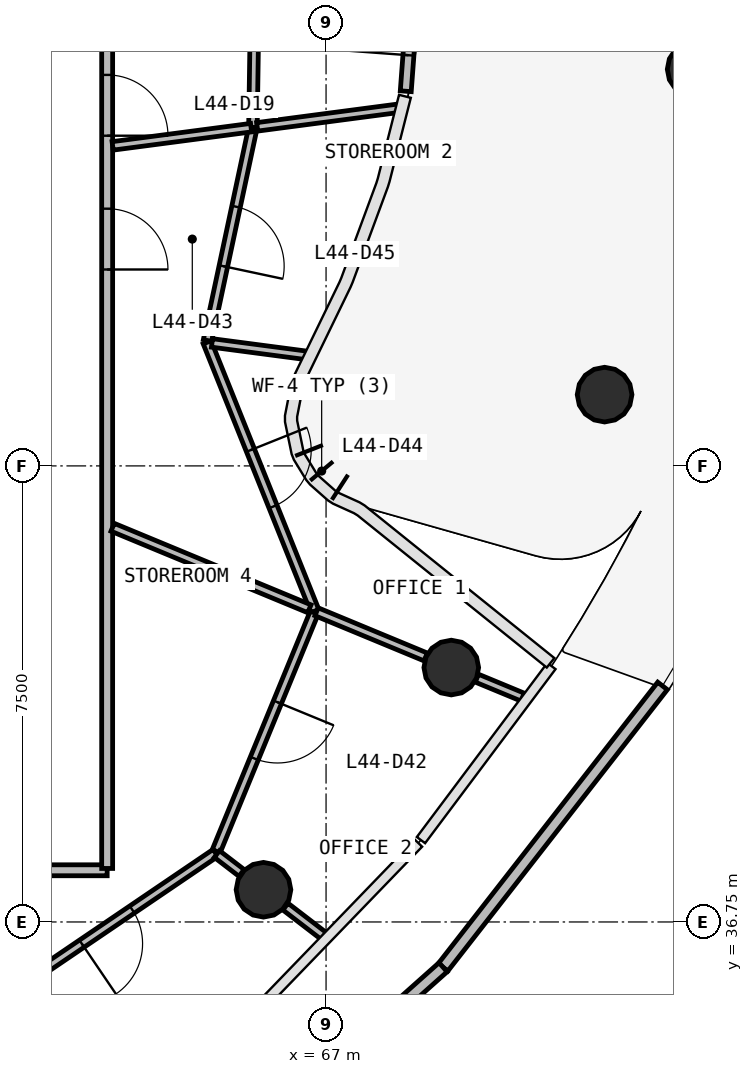
"""IFC4 building model, lengths in metres.
Left out: names, types, materials, properties, quantities, classifications, styles, units other than length and angle.
Written with IfcOpenShell. Run it as: python <this file> out.ifc"""

import sys

from ifc_helpers import new_model, si_unit, direction, frame, frame_2d, origin, origin_2d, place, context, subcontext, project, spatial, rectangle, circle, extrude, source, transform, mapped, element, fill, save


model = new_model("IFC4")
c1 = context("Model", 3, precision=1e-05, world=origin(), true_north=direction((0.0, 1.0)))
c2 = subcontext(c1, "Body", "Model", "MODEL_VIEW")
j1 = project(units=[si_unit("LENGTHUNIT", "METRE"), si_unit("PLANEANGLEUNIT", "RADIAN")], contexts=[c1])
p1 = place(None, origin())
s1 = spatial("IfcSite", under=j1, at=p1, CompositionType="ELEMENT")
p2 = place(p1, origin())
s2 = spatial("IfcBuilding", under=s1, at=p2, CompositionType="ELEMENT")
p3 = place(p2, frame((0.0, 0.0, 183.8)))
s3 = spatial("IfcBuildingStorey", under=s2, at=p3, CompositionType="ELEMENT", Elevation=183.8)
m1 = source(origin(), c2, "Body", "SweptSolid", [
    extrude(circle(Radius=0.45, at=origin_2d()), origin(), (0.0, 0.0, 1.0), 4.22),
])
for number, where, z_axis, x_axis in (
    (1, (73.062, 50.773, -0.32), (0.0, 0.0, 1.0), (1.0, 0.0, 0.0)),
    (2, (65.971, 37.28, -0.32), (0.0, 0.0, 1.0), (1.0, 0.0, 0.0)),
    (3, (69.059, 40.934, -0.32), (0.0, 0.0, 1.0), (1.0, 0.0, 0.0)),
    (4, (71.581, 45.422, -0.32), (0.0, 0.0, 1.0), (1.0, 0.0, 0.0)),
):
    element("IfcColumn", number, at=place(p3, frame(where, z_axis=z_axis, x_axis=x_axis)), inside=s3, PredefinedType="COLUMN", context=c2, shape_type="MappedRepresentation", body=[
        mapped(m1, transform((0.0, 0.0, 0.0), scale=1.0)),
    ])
p4 = place(p3, frame((68.311, 50.412, 0.0), z_axis=(0.0, 0.0, 1.0), x_axis=(0.074271967477, 0.997238023166, 0.0)))
e5 = element("IfcWall", 5, at=p4, inside=s3, PredefinedType="STANDARD", context=c2, shape_type="SweptSolid", body=[
    extrude(rectangle(XDim=2.988, YDim=0.18, at=frame_2d((1.494, 0.0))), origin(), (0.0, 0.0, 1.0), 3.58),
])
p5 = place(p4, frame((0.594, 0.0, 0.0)))
e6 = element("IfcOpeningElement", 6, at=p5, cuts=e5, PredefinedType="OPENING", context=c2, shape_type="SweptSolid", body=[
    extrude(rectangle(XDim=1.8, YDim=2.4, at=frame_2d((0.9, 1.2))), frame((0.0, 0.1, 0.0), z_axis=(0.0, -1.0, 0.0), x_axis=(1.0, 0.0, 0.0)), (0.0, 0.0, 1.0), 0.2),
])
p6 = place(p3, frame((72.534, 40.632, 0.0), z_axis=(0.0, 0.0, 1.0), x_axis=(-0.615037489788, -0.788497866931, 0.0)))
e7 = element("IfcWall", 7, at=p6, inside=s3, PredefinedType="PARAPET", context=c2, shape_type="SweptSolid", body=[
    extrude(rectangle(XDim=5.868, YDim=0.2, at=frame_2d((2.934, 0.0))), origin(), (0.0, 0.0, 1.0), 1.1),
])
p7 = place(p3, frame((68.925, 36.005, 0.0), z_axis=(0.0, 0.0, 1.0), x_axis=(-0.746520458461, -0.665362461444, 0.0)))
e8 = element("IfcWall", 8, at=p7, inside=s3, PredefinedType="PARAPET", context=c2, shape_type="SweptSolid", body=[
    extrude(rectangle(XDim=5.869, YDim=0.2, at=frame_2d((2.935, 0.0))), origin(), (0.0, 0.0, 1.0), 1.1),
])
p8 = place(p3, frame((63.4, 37.6, 0.0), z_axis=(0.0, 0.0, 1.0), x_axis=(-1.0, 0.0, 0.0)))
e9 = element("IfcWall", 9, at=p8, inside=s3, PredefinedType="PARTITIONING", context=c2, shape_type="SweptSolid", body=[
    extrude(rectangle(XDim=22.8, YDim=0.18, at=frame_2d((11.4, 0.0))), origin(), (0.0, 0.0, 1.0), 2.88),
])
p9 = place(p8, frame((10.95, 0.0, 0.0)))
e10 = element("IfcOpeningElement", 10, at=p9, cuts=e9, PredefinedType="OPENING", context=c2, shape_type="SweptSolid", body=[
    extrude(rectangle(XDim=1.0, YDim=2.1, at=frame_2d((0.5, 1.05))), frame((0.0, 0.1, 0.0), z_axis=(0.0, -1.0, 0.0), x_axis=(1.0, 0.0, 0.0)), (0.0, 0.0, 1.0), 0.2),
])
p10 = place(p8, frame((5.75, 0.0, 0.0)))
e11 = element("IfcOpeningElement", 11, at=p10, cuts=e9, PredefinedType="OPENING", context=c2, shape_type="SweptSolid", body=[
    extrude(rectangle(XDim=1.0, YDim=2.1, at=frame_2d((0.5, 1.05))), frame((0.0, 0.1, 0.0), z_axis=(0.0, -1.0, 0.0), x_axis=(1.0, 0.0, 0.0)), (0.0, 0.0, 1.0), 0.2),
])
p11 = place(p3, frame((63.4, 58.37, 0.0), z_axis=(0.0, 0.0, 1.0), x_axis=(0.0, -1.0, 0.0)))
e12 = element("IfcWall", 12, at=p11, inside=s3, PredefinedType="PARTITIONING", context=c2, shape_type="SweptSolid", body=[
    extrude(rectangle(XDim=20.74, YDim=0.18, at=frame_2d((10.37, 0.0))), origin(), (0.0, 0.0, 1.0), 2.88),
])
p12 = place(p11, frame((7.69, 0.0, 0.0)))
e13 = element("IfcOpeningElement", 13, at=p12, cuts=e12, PredefinedType="OPENING", context=c2, shape_type="SweptSolid", body=[
    extrude(rectangle(XDim=1.0, YDim=2.1, at=frame_2d((0.5, 1.05))), frame((0.0, 0.1, 0.0), z_axis=(0.0, -1.0, 0.0), x_axis=(1.0, 0.0, 0.0)), (0.0, 0.0, 1.0), 0.2),
])
p13 = place(p11, frame((9.89, 0.0, 0.0)))
e14 = element("IfcOpeningElement", 14, at=p13, cuts=e12, PredefinedType="OPENING", context=c2, shape_type="SweptSolid", body=[
    extrude(rectangle(XDim=1.0, YDim=2.1, at=frame_2d((0.5, 1.05))), frame((0.0, 0.1, 0.0), z_axis=(0.0, -1.0, 0.0), x_axis=(1.0, 0.0, 0.0)), (0.0, 0.0, 1.0), 0.2),
])
p14 = place(p3, frame((65.044, 46.283, 0.0), z_axis=(0.0, 0.0, 1.0), x_axis=(0.372115410521, -0.92818646901, 0.0)))
e15 = element("IfcWall", 15, at=p14, inside=s3, PredefinedType="PARTITIONING", context=c2, shape_type="SweptSolid", body=[
    extrude(rectangle(XDim=4.762, YDim=0.14, at=frame_2d((2.381, 0.0))), origin(), (0.0, 0.0, 1.0), 2.88),
])
p15 = place(p14, frame((1.912, 0.0, 0.0)))
e16 = element("IfcOpeningElement", 16, at=p15, cuts=e15, PredefinedType="OPENING", context=c2, shape_type="SweptSolid", body=[
    extrude(rectangle(XDim=1.0, YDim=2.1, at=frame_2d((0.5, 1.05))), frame((0.0, 0.08, 0.0), z_axis=(0.0, -1.0, 0.0), x_axis=(1.0, 0.0, 0.0)), (0.0, 0.0, 1.0), 0.16),
])
p16 = place(p3, frame((65.182, 37.885, 0.0), z_axis=(0.0, 0.0, 1.0), x_axis=(-0.827453202768, -0.561534680344, 0.0)))
e17 = element("IfcWall", 17, at=p16, inside=s3, PredefinedType="PARTITIONING", context=c2, shape_type="SweptSolid", body=[
    extrude(rectangle(XDim=4.308, YDim=0.14, at=frame_2d((2.154, 0.0))), origin(), (0.0, 0.0, 1.0), 2.88),
])
p17 = place(p16, frame((1.658, 0.0, 0.0)))
e18 = element("IfcOpeningElement", 18, at=p17, cuts=e17, PredefinedType="OPENING", context=c2, shape_type="SweptSolid", body=[
    extrude(rectangle(XDim=1.0, YDim=2.1, at=frame_2d((0.5, 1.05))), frame((0.0, 0.08, 0.0), z_axis=(0.0, -1.0, 0.0), x_axis=(1.0, 0.0, 0.0)), (0.0, 0.0, 1.0), 0.16),
])
p18 = place(p3, frame((66.805, 41.835, 0.0), z_axis=(0.0, 0.0, 1.0), x_axis=(-0.380060488543, -0.924961634366, 0.0)))
e19 = element("IfcWall", 19, at=p18, inside=s3, PredefinedType="PARTITIONING", context=c2, shape_type="SweptSolid", body=[
    extrude(rectangle(XDim=4.24, YDim=0.14, at=frame_2d((2.12, 0.0))), origin(), (0.0, 0.0, 1.0), 2.88),
])
p19 = place(p18, frame((1.59, 0.0, 0.0)))
e20 = element("IfcOpeningElement", 20, at=p19, cuts=e19, PredefinedType="OPENING", context=c2, shape_type="SweptSolid", body=[
    extrude(rectangle(XDim=1.0, YDim=2.1, at=frame_2d((0.5, 1.05))), frame((0.0, 0.08, 0.0), z_axis=(0.0, -1.0, 0.0), x_axis=(1.0, 0.0, 0.0)), (0.0, 0.0, 1.0), 0.16),
])
p20 = place(p3, frame((65.855, 53.709, 0.0), z_axis=(0.0, 0.0, 1.0), x_axis=(-0.014924646714, -0.999888621258, 0.0)))
e21 = element("IfcWall", 21, at=p20, inside=s3, PredefinedType="PARTITIONING", context=c2, shape_type="SweptSolid", body=[
    extrude(rectangle(XDim=3.893, YDim=0.14, at=frame_2d((1.947, 0.0))), origin(), (0.0, 0.0, 1.0), 2.88),
])
p21 = place(p20, frame((1.443, 0.0, 0.0)))
e22 = element("IfcOpeningElement", 22, at=p21, cuts=e21, PredefinedType="OPENING", context=c2, shape_type="SweptSolid", body=[
    extrude(rectangle(XDim=1.0, YDim=2.1, at=frame_2d((0.5, 1.05))), frame((0.0, 0.08, 0.0), z_axis=(0.0, -1.0, 0.0), x_axis=(1.0, 0.0, 0.0)), (0.0, 0.0, 1.0), 0.16),
])
p22 = place(p3, frame((63.49, 43.241, 0.0), z_axis=(0.0, 0.0, 1.0), x_axis=(0.92386899199, -0.382708878444, 0.0)))
e23 = element("IfcWall", 23, at=p22, inside=s3, PredefinedType="PARTITIONING", context=c2, shape_type="SweptSolid", body=[
    extrude(rectangle(XDim=3.502, YDim=0.14, at=frame_2d((1.751, 0.0))), origin(), (0.0, 0.0, 1.0), 2.88),
])
p23 = place(p3, frame((65.791, 49.787, 0.0), z_axis=(0.0, 0.0, 1.0), x_axis=(-0.20840274736, -0.978043094599, 0.0)))
e24 = element("IfcWall", 24, at=p23, inside=s3, PredefinedType="PARTITIONING", context=c2, shape_type="SweptSolid", body=[
    extrude(rectangle(XDim=3.553, YDim=0.14, at=frame_2d((1.777, 0.0))), origin(), (0.0, 0.0, 1.0), 2.88),
])
p24 = place(p23, frame((1.303, 0.0, 0.0)))
e25 = element("IfcOpeningElement", 25, at=p24, cuts=e24, PredefinedType="OPENING", context=c2, shape_type="SweptSolid", body=[
    extrude(rectangle(XDim=1.0, YDim=2.1, at=frame_2d((0.5, 1.05))), frame((0.0, 0.08, 0.0), z_axis=(0.0, -1.0, 0.0), x_axis=(1.0, 0.0, 0.0)), (0.0, 0.0, 1.0), 0.16),
])
p25 = place(p3, frame((65.867, 49.826, 0.0), z_axis=(0.0, 0.0, 1.0), x_axis=(0.991441898965, 0.130548691974, 0.0)))
e26 = element("IfcWall", 26, at=p25, inside=s3, PredefinedType="PARTITIONING", context=c2, shape_type="SweptSolid", body=[
    extrude(rectangle(XDim=2.347, YDim=0.14, at=frame_2d((1.173, 0.0))), origin(), (0.0, 0.0, 1.0), 2.88),
])
p26 = place(p3, frame((63.49, 49.513, 0.0), z_axis=(0.0, 0.0, 1.0), x_axis=(0.991447421324, 0.130506745995, 0.0)))
e27 = element("IfcWall", 27, at=p26, inside=s3, PredefinedType="PARTITIONING", context=c2, shape_type="SweptSolid", body=[
    extrude(rectangle(XDim=2.297, YDim=0.14, at=frame_2d((1.148, 0.0))), origin(), (0.0, 0.0, 1.0), 2.88),
])
p27 = place(p3, frame((66.844, 41.852, 0.0), z_axis=(0.0, 0.0, 1.0), x_axis=(0.923848346372, -0.38275871369, 0.0)))
e28 = element("IfcWall", 28, at=p27, inside=s3, PredefinedType="PARTITIONING", context=c2, shape_type="SweptSolid", body=[
    extrude(rectangle(XDim=1.943, YDim=0.14, at=frame_2d((0.971, 0.0))), origin(), (0.0, 0.0, 1.0), 2.88),
])
p28 = place(p3, frame((65.124, 46.272, 0.0), z_axis=(0.0, 0.0, 1.0), x_axis=(0.991440073303, -0.130562556072, 0.0)))
e29 = element("IfcWall", 29, at=p28, inside=s3, PredefinedType="PARTITIONING", context=c2, shape_type="SweptSolid", body=[
    extrude(rectangle(XDim=1.578, YDim=0.14, at=frame_2d((0.789, 0.0))), origin(), (0.0, 0.0, 1.0), 2.88),
])
p29 = place(p3, frame((69.48, 40.76, 0.0), z_axis=(0.0, 0.0, 1.0), x_axis=(0.92398761999, -0.382422381806, 0.0)))
e30 = element("IfcWall", 30, at=p29, inside=s3, PredefinedType="PARTITIONING", context=c2, shape_type="SweptSolid", body=[
    extrude(rectangle(XDim=0.815, YDim=0.14, at=frame_2d((0.407, 0.0))), origin(), (0.0, 0.0, 1.0), 2.88),
])
p30 = place(p3, frame((66.332, 37.003, 0.0), z_axis=(0.0, 0.0, 1.0), x_axis=(0.793364436395, -0.608746968011, 0.0)))
e31 = element("IfcWall", 31, at=p30, inside=s3, PredefinedType="PARTITIONING", context=c2, shape_type="SweptSolid", body=[
    extrude(rectangle(XDim=0.796, YDim=0.14, at=frame_2d((0.398, 0.0))), origin(), (0.0, 0.0, 1.0), 2.88),
])
p31 = place(p3, frame((65.205, 37.867, 0.0), z_axis=(0.0, 0.0, 1.0), x_axis=(0.793352294755, -0.608762791575, 0.0)))
e32 = element("IfcWall", 32, at=p31, inside=s3, PredefinedType="PARTITIONING", context=c2, shape_type="SweptSolid", body=[
    extrude(rectangle(XDim=0.51, YDim=0.14, at=frame_2d((0.255, 0.0))), origin(), (0.0, 0.0, 1.0), 2.88),
])
m2 = source(origin(), c2, "Body", "SweptSolid", [
    extrude(rectangle(XDim=1.8, YDim=2.4, at=frame_2d((0.9, 1.2))), frame((0.0, 0.025, 0.0), z_axis=(0.0, -1.0, 0.0), x_axis=(1.0, 0.0, 0.0)), (0.0, 0.0, 1.0), 0.05),
])
p32 = place(p5, origin())
e33 = element("IfcDoor", 33, at=p32, inside=s3, OperationType="DOUBLE_DOOR_SINGLE_SWING", PredefinedType="DOOR", context=c2, shape_type="MappedRepresentation", body=[
    mapped(m2, transform((0.0, 0.0, 0.0), scale=1.0)),
])
fill(e6, e33)
m3 = source(origin(), c2, "Body", "SweptSolid", [
    extrude(rectangle(XDim=1.0, YDim=2.1, at=frame_2d((0.5, 1.05))), frame((0.0, 0.025, 0.0), z_axis=(0.0, -1.0, 0.0), x_axis=(1.0, 0.0, 0.0)), (0.0, 0.0, 1.0), 0.05),
])
p33 = place(p12, origin())
e34 = element("IfcDoor", 34, at=p33, inside=s3, OperationType="SINGLE_SWING_RIGHT", PredefinedType="DOOR", context=c2, shape_type="MappedRepresentation", body=[
    mapped(m3, transform((0.0, 0.0, 0.0), scale=1.0)),
])
fill(e13, e34)
p34 = place(p17, origin())
e35 = element("IfcDoor", 35, at=p34, inside=s3, OperationType="SINGLE_SWING_RIGHT", PredefinedType="DOOR", context=c2, shape_type="MappedRepresentation", body=[
    mapped(m3, transform((0.0, 0.0, 0.0), scale=1.0)),
])
fill(e18, e35)
p35 = place(p19, origin())
e36 = element("IfcDoor", 36, at=p35, inside=s3, OperationType="SINGLE_SWING_LEFT", PredefinedType="DOOR", context=c2, shape_type="MappedRepresentation", body=[
    mapped(m3, transform((0.0, 0.0, 0.0), scale=1.0)),
])
fill(e20, e36)
p36 = place(p13, origin())
e37 = element("IfcDoor", 37, at=p36, inside=s3, OperationType="SINGLE_SWING_RIGHT", PredefinedType="DOOR", context=c2, shape_type="MappedRepresentation", body=[
    mapped(m3, transform((0.0, 0.0, 0.0), scale=1.0)),
])
fill(e14, e37)
p37 = place(p15, origin())
e38 = element("IfcDoor", 38, at=p37, inside=s3, OperationType="SINGLE_SWING_LEFT", PredefinedType="DOOR", context=c2, shape_type="MappedRepresentation", body=[
    mapped(m3, transform((0.0, 0.0, 0.0), scale=1.0)),
])
fill(e16, e38)
p38 = place(p24, origin())
e39 = element("IfcDoor", 39, at=p38, inside=s3, OperationType="SINGLE_SWING_RIGHT", PredefinedType="DOOR", context=c2, shape_type="MappedRepresentation", body=[
    mapped(m3, transform((0.0, 0.0, 0.0), scale=1.0)),
])
fill(e25, e39)
save(model, sys.argv[1])
